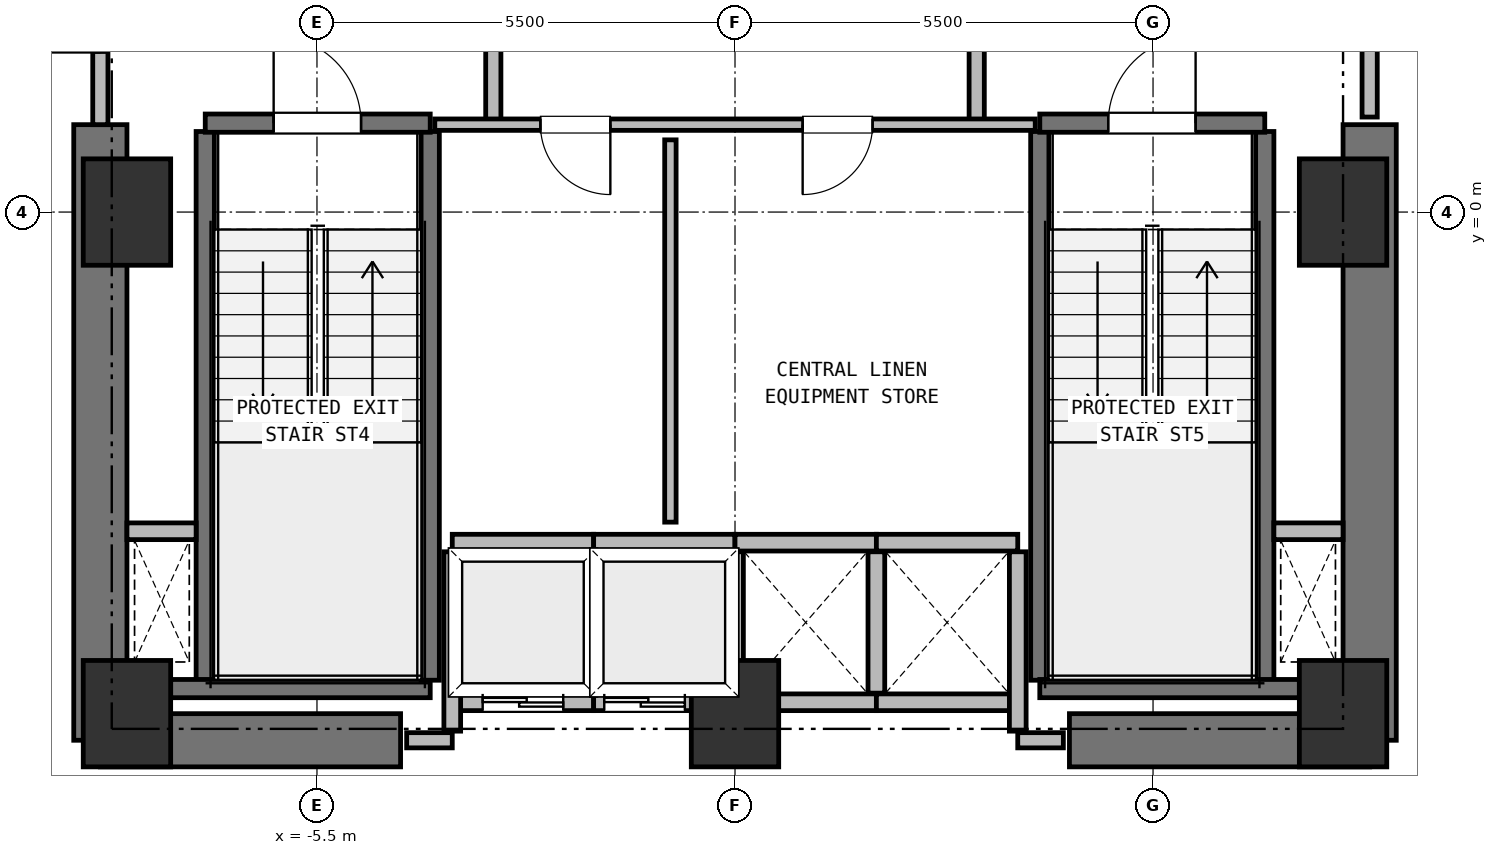
"""IFC4 building model, lengths in metres.
Left out: names, types, materials, properties, quantities, classifications, styles, units other than length and angle.
Written with IfcOpenShell. Run it as: python <this file> out.ifc"""

import sys

from ifc_helpers import new_model, si_unit, direction, frame, frame_2d, origin, origin_2d, place, context, subcontext, project, spatial, rectangle, extrude, element, fill, save


model = new_model("IFC4")
c1 = context("Model", 3, precision=1e-05, world=origin(), true_north=direction((0.0, 1.0)))
c2 = subcontext(c1, "Body", "Model", "MODEL_VIEW")
j1 = project(units=[si_unit("LENGTHUNIT", "METRE"), si_unit("PLANEANGLEUNIT", "RADIAN")], contexts=[c1])
p1 = place(None, origin())
s1 = spatial("IfcSite", under=j1, at=p1, CompositionType="ELEMENT")
p2 = place(p1, origin())
s2 = spatial("IfcBuilding", under=s1, at=p2, CompositionType="ELEMENT")
p3 = place(p2, frame((0.0, 0.0, 71.75)))
s3 = spatial("IfcBuildingStorey", under=s2, at=p3, CompositionType="ELEMENT", Elevation=71.75)
for number, where, z_axis, x_axis in (
    (1, (-8.0, -6.6, 0.0), (0.0, 0.0, 1.0), (1.0, 0.0, 0.0)),
    (2, (0.0, -6.6, 0.0), (0.0, 0.0, 1.0), (1.0, 0.0, 0.0)),
    (3, (8.0, -6.6, 0.0), (0.0, 0.0, 1.0), (1.0, 0.0, 0.0)),
    (4, (8.0, 0.0, 0.0), (0.0, 0.0, 1.0), (1.0, 0.0, 0.0)),
    (5, (-8.0, 0.0, 0.0), (0.0, 0.0, 1.0), (1.0, 0.0, 0.0)),
):
    element("IfcColumn", number, at=place(p3, frame(where, z_axis=z_axis, x_axis=x_axis)), inside=s3, PredefinedType="COLUMN", context=c2, shape_type="SweptSolid", body=[
        extrude(rectangle(XDim=1.15, YDim=1.4, at=origin_2d()), origin(), (0.0, 0.0, 1.0), 3.75),
    ])
for number, where, z_axis, x_axis in (
    (6, (-8.35, -6.95, 0.0), (0.0, 0.0, 1.0), (1.0, 0.0, 0.0)),
    (7, (4.4, -6.95, 0.0), (0.0, 0.0, 1.0), (1.0, 0.0, 0.0)),
):
    element("IfcWall", number, at=place(p3, frame(where, z_axis=z_axis, x_axis=x_axis)), inside=s3, PredefinedType="SHEAR", context=c2, shape_type="SweptSolid", body=[
        extrude(rectangle(XDim=3.95, YDim=0.7, at=frame_2d((1.975, 0.0))), origin(), (0.0, 0.0, 1.0), 3.5),
    ])
for number, where, z_axis, x_axis in (
    (8, (-8.35, -6.95, 0.0), (0.0, 0.0, 1.0), (0.0, 1.0, 0.0)),
    (9, (8.35, -6.95, 0.0), (0.0, 0.0, 1.0), (0.0, 1.0, 0.0)),
):
    element("IfcWall", number, at=place(p3, frame(where, z_axis=z_axis, x_axis=x_axis)), inside=s3, PredefinedType="SHEAR", context=c2, shape_type="SweptSolid", body=[
        extrude(rectangle(XDim=8.1, YDim=0.7, at=frame_2d((4.05, 0.0))), origin(), (0.0, 0.0, 1.0), 3.5),
    ])
p4 = place(p3, frame((-6.97, -6.16, 0.0), z_axis=(0.0, 0.0, 1.0), x_axis=(0.0, 1.0, 0.0)))
e10 = element("IfcWall", 10, at=p4, inside=s3, PredefinedType="SHEAR", context=c2, shape_type="SweptSolid", body=[
    extrude(rectangle(XDim=7.22, YDim=0.24, at=frame_2d((3.61, 0.0))), origin(), (0.0, 0.0, 1.0), 3.5),
])
p5 = place(p3, frame((-7.425, -6.27, 0.0), z_axis=(0.0, 0.0, 1.0), x_axis=(1.0, 0.0, 0.0)))
e11 = element("IfcWall", 11, at=p5, inside=s3, PredefinedType="SHEAR", context=c2, shape_type="SweptSolid", body=[
    extrude(rectangle(XDim=3.415, YDim=0.24, at=frame_2d((1.708, 0.0))), origin(), (0.0, 0.0, 1.0), 3.5),
])
p6 = place(p3, frame((-4.01, -6.16, 0.0), z_axis=(0.0, 0.0, 1.0), x_axis=(0.0, 1.0, 0.0)))
e12 = element("IfcWall", 12, at=p6, inside=s3, PredefinedType="SHEAR", context=c2, shape_type="SweptSolid", body=[
    extrude(rectangle(XDim=7.22, YDim=0.24, at=frame_2d((3.61, 0.0))), origin(), (0.0, 0.0, 1.0), 3.5),
])
p7 = place(p3, frame((-6.97, 1.17, 0.0), z_axis=(0.0, 0.0, 1.0), x_axis=(1.0, 0.0, 0.0)))
e13 = element("IfcWall", 13, at=p7, inside=s3, PredefinedType="SHEAR", context=c2, shape_type="SweptSolid", body=[
    extrude(rectangle(XDim=2.96, YDim=0.24, at=frame_2d((1.48, 0.0))), origin(), (0.0, 0.0, 1.0), 3.5),
])
p8 = place(p7, frame((0.9, 0.0, 0.0)))
e14 = element("IfcOpeningElement", 14, at=p8, cuts=e13, PredefinedType="OPENING", context=c2, shape_type="SweptSolid", body=[
    extrude(rectangle(XDim=1.15, YDim=2.15, at=frame_2d((0.575, 1.075))), frame((0.0, 0.13, 0.0), z_axis=(0.0, -1.0, 0.0), x_axis=(1.0, 0.0, 0.0)), (0.0, 0.0, 1.0), 0.26),
])
for number, where, z_axis, x_axis in (
    (15, (4.01, -6.16, 0.0), (0.0, 0.0, 1.0), (0.0, 1.0, 0.0)),
    (16, (6.97, -6.16, 0.0), (0.0, 0.0, 1.0), (0.0, 1.0, 0.0)),
):
    element("IfcWall", number, at=place(p3, frame(where, z_axis=z_axis, x_axis=x_axis)), inside=s3, PredefinedType="SHEAR", context=c2, shape_type="SweptSolid", body=[
        extrude(rectangle(XDim=7.22, YDim=0.24, at=frame_2d((3.61, 0.0))), origin(), (0.0, 0.0, 1.0), 3.5),
    ])
p9 = place(p3, frame((4.01, -6.27, 0.0), z_axis=(0.0, 0.0, 1.0), x_axis=(1.0, 0.0, 0.0)))
e17 = element("IfcWall", 17, at=p9, inside=s3, PredefinedType="SHEAR", context=c2, shape_type="SweptSolid", body=[
    extrude(rectangle(XDim=3.415, YDim=0.24, at=frame_2d((1.708, 0.0))), origin(), (0.0, 0.0, 1.0), 3.5),
])
p10 = place(p3, frame((4.01, 1.17, 0.0), z_axis=(0.0, 0.0, 1.0), x_axis=(1.0, 0.0, 0.0)))
e18 = element("IfcWall", 18, at=p10, inside=s3, PredefinedType="SHEAR", context=c2, shape_type="SweptSolid", body=[
    extrude(rectangle(XDim=2.96, YDim=0.24, at=frame_2d((1.48, 0.0))), origin(), (0.0, 0.0, 1.0), 3.5),
])
p11 = place(p10, frame((0.9, 0.0, 0.0)))
e19 = element("IfcOpeningElement", 19, at=p11, cuts=e18, PredefinedType="OPENING", context=c2, shape_type="SweptSolid", body=[
    extrude(rectangle(XDim=1.15, YDim=2.15, at=frame_2d((0.575, 1.075))), frame((0.0, 0.13, 0.0), z_axis=(0.0, -1.0, 0.0), x_axis=(1.0, 0.0, 0.0)), (0.0, 0.0, 1.0), 0.26),
])
for number, where, z_axis, x_axis in (
    (20, (-8.0, -4.2, 0.0), (0.0, 0.0, 1.0), (1.0, 0.0, 0.0)),
    (21, (7.09, -4.2, 0.0), (0.0, 0.0, 1.0), (1.0, 0.0, 0.0)),
):
    element("IfcWall", number, at=place(p3, frame(where, z_axis=z_axis, x_axis=x_axis)), inside=s3, PredefinedType="PARTITIONING", context=c2, shape_type="SweptSolid", body=[
        extrude(rectangle(XDim=0.91, YDim=0.22, at=frame_2d((0.455, 0.0))), origin(), (0.0, 0.0, 1.0), 3.5),
    ])
p12 = place(p3, frame((-3.72, -6.45, 0.0), z_axis=(0.0, 0.0, 1.0), x_axis=(1.0, 0.0, 0.0)))
e22 = element("IfcWall", 22, at=p12, inside=s3, PredefinedType="PARTITIONING", context=c2, shape_type="SweptSolid", body=[
    extrude(rectangle(XDim=1.86, YDim=0.22, at=frame_2d((0.93, 0.0))), origin(), (0.0, 0.0, 1.0), 3.08),
])
p13 = place(p12, frame((0.4, 0.0, 0.0)))
e23 = element("IfcOpeningElement", 23, at=p13, cuts=e22, PredefinedType="OPENING", context=c2, shape_type="SweptSolid", body=[
    extrude(rectangle(XDim=1.06, YDim=2.15, at=frame_2d((0.53, 1.075))), frame((0.0, 0.12, 0.0), z_axis=(0.0, -1.0, 0.0), x_axis=(1.0, 0.0, 0.0)), (0.0, 0.0, 1.0), 0.24),
])
p14 = place(p3, frame((-3.72, -4.35, 0.0), z_axis=(0.0, 0.0, 1.0), x_axis=(1.0, 0.0, 0.0)))
e24 = element("IfcWall", 24, at=p14, inside=s3, PredefinedType="PARTITIONING", context=c2, shape_type="SweptSolid", body=[
    extrude(rectangle(XDim=1.86, YDim=0.22, at=frame_2d((0.93, 0.0))), origin(), (0.0, 0.0, 1.0), 3.5),
])
p15 = place(p3, frame((-3.72, -6.83, 0.0), z_axis=(0.0, 0.0, 1.0), x_axis=(0.0, 1.0, 0.0)))
e25 = element("IfcWall", 25, at=p15, inside=s3, PredefinedType="PARTITIONING", context=c2, shape_type="SweptSolid", body=[
    extrude(rectangle(XDim=2.36, YDim=0.22, at=frame_2d((1.18, 0.0))), origin(), (0.0, 0.0, 1.0), 3.5),
])
p16 = place(p3, frame((-1.86, -6.33, 0.0), z_axis=(0.0, 0.0, 1.0), x_axis=(0.0, 1.0, 0.0)))
e26 = element("IfcWall", 26, at=p16, inside=s3, PredefinedType="PARTITIONING", context=c2, shape_type="SweptSolid", body=[
    extrude(rectangle(XDim=1.86, YDim=0.22, at=frame_2d((0.93, 0.0))), origin(), (0.0, 0.0, 1.0), 3.5),
])
p17 = place(p3, frame((-1.86, -6.45, 0.0), z_axis=(0.0, 0.0, 1.0), x_axis=(1.0, 0.0, 0.0)))
e27 = element("IfcWall", 27, at=p17, inside=s3, PredefinedType="PARTITIONING", context=c2, shape_type="SweptSolid", body=[
    extrude(rectangle(XDim=1.86, YDim=0.22, at=frame_2d((0.93, 0.0))), origin(), (0.0, 0.0, 1.0), 3.08),
])
p18 = place(p17, frame((0.14, 0.0, 0.0)))
e28 = element("IfcOpeningElement", 28, at=p18, cuts=e27, PredefinedType="OPENING", context=c2, shape_type="SweptSolid", body=[
    extrude(rectangle(XDim=1.06, YDim=2.15, at=frame_2d((0.53, 1.075))), frame((0.0, 0.12, 0.0), z_axis=(0.0, -1.0, 0.0), x_axis=(1.0, 0.0, 0.0)), (0.0, 0.0, 1.0), 0.24),
])
for number, where, z_axis, x_axis in (
    (29, (-1.86, -4.35, 0.0), (0.0, 0.0, 1.0), (1.0, 0.0, 0.0)),
    (30, (0.0, -6.33, 0.0), (0.0, 0.0, 1.0), (0.0, 1.0, 0.0)),
):
    element("IfcWall", number, at=place(p3, frame(where, z_axis=z_axis, x_axis=x_axis)), inside=s3, PredefinedType="PARTITIONING", context=c2, shape_type="SweptSolid", body=[
        extrude(rectangle(XDim=1.86, YDim=0.22, at=frame_2d((0.93, 0.0))), origin(), (0.0, 0.0, 1.0), 3.5),
    ])
p19 = place(p3, frame((0.0, -6.45, 0.0), z_axis=(0.0, 0.0, 1.0), x_axis=(1.0, 0.0, 0.0)))
e31 = element("IfcWall", 31, at=p19, inside=s3, PredefinedType="PARTITIONING", context=c2, shape_type="SweptSolid", body=[
    extrude(rectangle(XDim=1.86, YDim=0.22, at=frame_2d((0.93, 0.0))), origin(), (0.0, 0.0, 1.0), 3.08),
])
for number, where, z_axis, x_axis in (
    (32, (0.0, -4.35, 0.0), (0.0, 0.0, 1.0), (1.0, 0.0, 0.0)),
    (33, (1.86, -6.33, 0.0), (0.0, 0.0, 1.0), (0.0, 1.0, 0.0)),
):
    element("IfcWall", number, at=place(p3, frame(where, z_axis=z_axis, x_axis=x_axis)), inside=s3, PredefinedType="PARTITIONING", context=c2, shape_type="SweptSolid", body=[
        extrude(rectangle(XDim=1.86, YDim=0.22, at=frame_2d((0.93, 0.0))), origin(), (0.0, 0.0, 1.0), 3.5),
    ])
p20 = place(p3, frame((1.86, -6.45, 0.0), z_axis=(0.0, 0.0, 1.0), x_axis=(1.0, 0.0, 0.0)))
e34 = element("IfcWall", 34, at=p20, inside=s3, PredefinedType="PARTITIONING", context=c2, shape_type="SweptSolid", body=[
    extrude(rectangle(XDim=1.86, YDim=0.22, at=frame_2d((0.93, 0.0))), origin(), (0.0, 0.0, 1.0), 3.08),
])
p21 = place(p3, frame((1.86, -4.35, 0.0), z_axis=(0.0, 0.0, 1.0), x_axis=(1.0, 0.0, 0.0)))
e35 = element("IfcWall", 35, at=p21, inside=s3, PredefinedType="PARTITIONING", context=c2, shape_type="SweptSolid", body=[
    extrude(rectangle(XDim=1.86, YDim=0.22, at=frame_2d((0.93, 0.0))), origin(), (0.0, 0.0, 1.0), 3.5),
])
p22 = place(p3, frame((3.72, -6.83, 0.0), z_axis=(0.0, 0.0, 1.0), x_axis=(0.0, 1.0, 0.0)))
e36 = element("IfcWall", 36, at=p22, inside=s3, PredefinedType="PARTITIONING", context=c2, shape_type="SweptSolid", body=[
    extrude(rectangle(XDim=2.36, YDim=0.22, at=frame_2d((1.18, 0.0))), origin(), (0.0, 0.0, 1.0), 3.5),
])
p23 = place(p3, frame((-3.18, 1.15, 0.0), z_axis=(0.0, 0.0, 1.0), x_axis=(0.0, 1.0, 0.0)))
e37 = element("IfcWall", 37, at=p23, inside=s3, PredefinedType="PARTITIONING", context=c2, shape_type="SweptSolid", body=[
    extrude(rectangle(XDim=3.3, YDim=0.2, at=frame_2d((1.65, 0.0))), origin(), (0.0, 0.0, 1.0), 3.5),
])
p24 = place(p23, frame((1.08, 0.0, 0.0)))
e38 = element("IfcOpeningElement", 38, at=p24, cuts=e37, PredefinedType="OPENING", context=c2, shape_type="SweptSolid", body=[
    extrude(rectangle(XDim=1.15, YDim=2.15, at=frame_2d((0.575, 1.075))), frame((0.0, 0.11, 0.0), z_axis=(0.0, -1.0, 0.0), x_axis=(1.0, 0.0, 0.0)), (0.0, 0.0, 1.0), 0.22),
])
p25 = place(p3, frame((3.18, 1.15, 0.0), z_axis=(0.0, 0.0, 1.0), x_axis=(0.0, 1.0, 0.0)))
e39 = element("IfcWall", 39, at=p25, inside=s3, PredefinedType="PARTITIONING", context=c2, shape_type="SweptSolid", body=[
    extrude(rectangle(XDim=3.3, YDim=0.2, at=frame_2d((1.65, 0.0))), origin(), (0.0, 0.0, 1.0), 3.5),
])
p26 = place(p25, frame((1.08, 0.0, 0.0)))
e40 = element("IfcOpeningElement", 40, at=p26, cuts=e39, PredefinedType="OPENING", context=c2, shape_type="SweptSolid", body=[
    extrude(rectangle(XDim=1.15, YDim=2.15, at=frame_2d((0.575, 1.075))), frame((0.0, 0.11, 0.0), z_axis=(0.0, -1.0, 0.0), x_axis=(1.0, 0.0, 0.0)), (0.0, 0.0, 1.0), 0.22),
])
p27 = place(p3, frame((-8.35, 1.15, 0.0), z_axis=(0.0, 0.0, 1.0), x_axis=(0.0, 1.0, 0.0)))
e41 = element("IfcWall", 41, at=p27, inside=s3, PredefinedType="PARTITIONING", context=c2, shape_type="SweptSolid", body=[
    extrude(rectangle(XDim=5.4, YDim=0.2, at=frame_2d((2.7, 0.0))), origin(), (0.0, 0.0, 1.0), 3.5),
])
p28 = place(p27, frame((0.95, 0.0, 0.0)))
e42 = element("IfcOpeningElement", 42, at=p28, cuts=e41, PredefinedType="OPENING", context=c2, shape_type="SweptSolid", body=[
    extrude(rectangle(XDim=1.15, YDim=2.15, at=frame_2d((0.575, 1.075))), frame((0.0, 0.11, 0.0), z_axis=(0.0, -1.0, 0.0), x_axis=(1.0, 0.0, 0.0)), (0.0, 0.0, 1.0), 0.22),
])
p29 = place(p3, frame((8.35, 1.25, 0.0), z_axis=(0.0, 0.0, 1.0), x_axis=(0.0, 1.0, 0.0)))
e43 = element("IfcWall", 43, at=p29, inside=s3, PredefinedType="PARTITIONING", context=c2, shape_type="SweptSolid", body=[
    extrude(rectangle(XDim=5.3, YDim=0.2, at=frame_2d((2.65, 0.0))), origin(), (0.0, 0.0, 1.0), 3.5),
])
p30 = place(p29, frame((0.95, 0.0, 0.0)))
e44 = element("IfcOpeningElement", 44, at=p30, cuts=e43, PredefinedType="OPENING", context=c2, shape_type="SweptSolid", body=[
    extrude(rectangle(XDim=1.15, YDim=2.15, at=frame_2d((0.575, 1.075))), frame((0.0, 0.11, 0.0), z_axis=(0.0, -1.0, 0.0), x_axis=(1.0, 0.0, 0.0)), (0.0, 0.0, 1.0), 0.22),
])
p31 = place(p3, frame((3.95, 1.15, 0.0), z_axis=(0.0, 0.0, 1.0), x_axis=(-1.0, 0.0, 0.0)))
e45 = element("IfcWall", 45, at=p31, inside=s3, PredefinedType="PARTITIONING", context=c2, shape_type="SweptSolid", body=[
    extrude(rectangle(XDim=7.9, YDim=0.15, at=frame_2d((3.95, 0.0))), origin(), (0.0, 0.0, 1.0), 3.5),
])
p32 = place(p31, frame((5.59, 0.0, 0.0)))
e46 = element("IfcOpeningElement", 46, at=p32, cuts=e45, PredefinedType="OPENING", context=c2, shape_type="SweptSolid", body=[
    extrude(rectangle(XDim=0.92, YDim=2.05, at=frame_2d((0.46, 1.025))), frame((0.0, 0.085, 0.0), z_axis=(0.0, -1.0, 0.0), x_axis=(1.0, 0.0, 0.0)), (0.0, 0.0, 1.0), 0.17),
])
p33 = place(p31, frame((2.14, 0.0, 0.0)))
e47 = element("IfcOpeningElement", 47, at=p33, cuts=e45, PredefinedType="OPENING", context=c2, shape_type="SweptSolid", body=[
    extrude(rectangle(XDim=0.92, YDim=2.05, at=frame_2d((0.46, 1.025))), frame((0.0, 0.085, 0.0), z_axis=(0.0, -1.0, 0.0), x_axis=(1.0, 0.0, 0.0)), (0.0, 0.0, 1.0), 0.17),
])
for number, where, z_axis, x_axis in (
    (48, (-4.32, -6.95, 0.0), (0.0, 0.0, 1.0), (1.0, 0.0, 0.0)),
    (49, (3.72, -6.95, 0.0), (0.0, 0.0, 1.0), (1.0, 0.0, 0.0)),
):
    element("IfcWall", number, at=place(p3, frame(where, z_axis=z_axis, x_axis=x_axis)), inside=s3, PredefinedType="PARTITIONING", context=c2, shape_type="SweptSolid", body=[
        extrude(rectangle(XDim=0.6, YDim=0.2, at=frame_2d((0.3, 0.0))), origin(), (0.0, 0.0, 1.0), 3.5),
    ])
p34 = place(p3, frame((-0.85, -4.08, 0.0), z_axis=(0.0, 0.0, 1.0), x_axis=(0.0, 1.0, 0.0)))
e50 = element("IfcWall", 50, at=p34, inside=s3, PredefinedType="PARTITIONING", context=c2, shape_type="SweptSolid", body=[
    extrude(rectangle(XDim=5.03, YDim=0.15, at=frame_2d((2.515, 0.0))), origin(), (0.0, 0.0, 1.0), 3.5),
])
p35 = place(p3, frame((10.752, -7.178, 0.0), z_axis=(0.0, 0.0, 1.0), x_axis=(-0.707067066127, -0.707146494016, 0.0)))
e51 = element("IfcWall", 51, at=p35, inside=s3, PredefinedType="PARTITIONING", context=c2, shape_type="SweptSolid", body=[
    extrude(rectangle(XDim=3.074, YDim=0.15, at=frame_2d((1.537, 0.0))), origin(), (0.0, 0.0, 1.0), 3.12),
])
p36 = place(p3, frame((-8.578, -9.352, 0.0), z_axis=(0.0, 0.0, 1.0), x_axis=(-0.707067066127, 0.707146494016, 0.0)))
e52 = element("IfcWall", 52, at=p36, inside=s3, PredefinedType="PARTITIONING", context=c2, shape_type="SweptSolid", body=[
    extrude(rectangle(XDim=3.074, YDim=0.15, at=frame_2d((1.537, 0.0))), origin(), (0.0, 0.0, 1.0), 3.5),
])
p37 = place(p8, origin())
e53 = element("IfcDoor", 53, at=p37, inside=s3, OperationType="SINGLE_SWING_LEFT", PredefinedType="DOOR", context=c2, shape_type="SweptSolid", body=[
    extrude(rectangle(XDim=1.15, YDim=2.15, at=frame_2d((0.575, 1.075))), frame((0.0, 0.025, 0.0), z_axis=(0.0, -1.0, 0.0), x_axis=(1.0, 0.0, 0.0)), (0.0, 0.0, 1.0), 0.05),
])
fill(e14, e53)
p38 = place(p11, origin())
e54 = element("IfcDoor", 54, at=p38, inside=s3, OperationType="SINGLE_SWING_RIGHT", PredefinedType="DOOR", context=c2, shape_type="SweptSolid", body=[
    extrude(rectangle(XDim=1.15, YDim=2.15, at=frame_2d((0.575, 1.075))), frame((0.0, 0.025, 0.0), z_axis=(0.0, -1.0, 0.0), x_axis=(1.0, 0.0, 0.0)), (0.0, 0.0, 1.0), 0.05),
])
fill(e19, e54)
p39 = place(p13, origin())
e55 = element("IfcDoor", 55, at=p39, inside=s3, OperationType="DOUBLE_DOOR_SLIDING", PredefinedType="DOOR", context=c2, shape_type="SweptSolid", body=[
    extrude(rectangle(XDim=1.06, YDim=2.15, at=frame_2d((0.53, 1.075))), frame((0.0, 0.025, 0.0), z_axis=(0.0, -1.0, 0.0), x_axis=(1.0, 0.0, 0.0)), (0.0, 0.0, 1.0), 0.05),
])
fill(e23, e55)
p40 = place(p18, origin())
e56 = element("IfcDoor", 56, at=p40, inside=s3, OperationType="DOUBLE_DOOR_SLIDING", PredefinedType="DOOR", context=c2, shape_type="SweptSolid", body=[
    extrude(rectangle(XDim=1.06, YDim=2.15, at=frame_2d((0.53, 1.075))), frame((0.0, 0.025, 0.0), z_axis=(0.0, -1.0, 0.0), x_axis=(1.0, 0.0, 0.0)), (0.0, 0.0, 1.0), 0.05),
])
fill(e28, e56)
p41 = place(p28, origin())
e57 = element("IfcDoor", 57, at=p41, inside=s3, OperationType="SINGLE_SWING_LEFT", PredefinedType="DOOR", context=c2, shape_type="SweptSolid", body=[
    extrude(rectangle(XDim=1.15, YDim=2.15, at=frame_2d((0.575, 1.075))), frame((0.0, 0.025, 0.0), z_axis=(0.0, -1.0, 0.0), x_axis=(1.0, 0.0, 0.0)), (0.0, 0.0, 1.0), 0.05),
])
fill(e42, e57)
p42 = place(p32, origin())
e58 = element("IfcDoor", 58, at=p42, inside=s3, OperationType="SINGLE_SWING_LEFT", PredefinedType="DOOR", context=c2, shape_type="SweptSolid", body=[
    extrude(rectangle(XDim=0.92, YDim=2.05, at=frame_2d((0.46, 1.025))), frame((0.0, 0.025, 0.0), z_axis=(0.0, -1.0, 0.0), x_axis=(1.0, 0.0, 0.0)), (0.0, 0.0, 1.0), 0.05),
])
fill(e46, e58)
p43 = place(p33, origin())
e59 = element("IfcDoor", 59, at=p43, inside=s3, OperationType="SINGLE_SWING_RIGHT", PredefinedType="DOOR", context=c2, shape_type="SweptSolid", body=[
    extrude(rectangle(XDim=0.92, YDim=2.05, at=frame_2d((0.46, 1.025))), frame((0.0, 0.025, 0.0), z_axis=(0.0, -1.0, 0.0), x_axis=(1.0, 0.0, 0.0)), (0.0, 0.0, 1.0), 0.05),
])
fill(e47, e59)
save(model, sys.argv[1])
